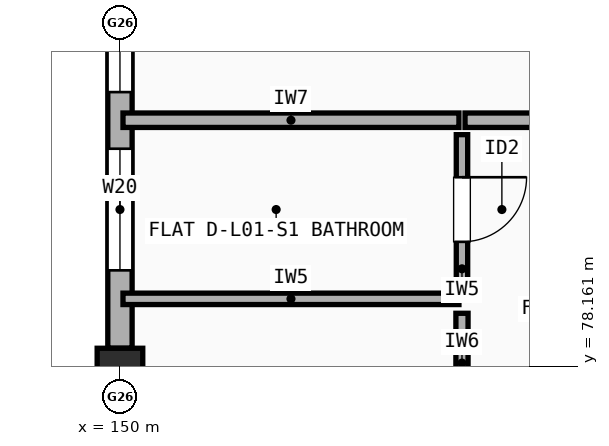
"""IFC4 building model, lengths in metres.
Left out: names, types, materials, properties, quantities, classifications, styles, units other than length and angle.
Written with IfcOpenShell. Run it as: python <this file> out.ifc"""

import sys

from ifc_helpers import new_model, si_unit, direction, frame, frame_2d, origin, origin_2d, place, context, subcontext, project, spatial, rectangle, extrude, element, fill, save


model = new_model("IFC4")
c1 = context("Model", 3, precision=1e-05, world=origin(), true_north=direction((0.0, 1.0)))
c2 = subcontext(c1, "Body", "Model", "MODEL_VIEW")
j1 = project(units=[si_unit("LENGTHUNIT", "METRE"), si_unit("PLANEANGLEUNIT", "RADIAN")], contexts=[c1])
p1 = place(None, origin())
s1 = spatial("IfcSite", under=j1, at=p1, CompositionType="ELEMENT")
p2 = place(p1, origin())
s2 = spatial("IfcBuilding", under=s1, at=p2, CompositionType="ELEMENT")
p3 = place(p2, frame((0.0, 0.0, 4.5)))
s3 = spatial("IfcBuildingStorey", under=s2, at=p3, CompositionType="ELEMENT", Elevation=4.5)
p4 = place(p3, frame((150.0, 78.0, 0.0), z_axis=(0.0, 0.0, 1.0), x_axis=(1.0, 0.0, 0.0)))
e1 = element("IfcColumn", 1, at=p4, inside=s3, PredefinedType="COLUMN", context=c2, shape_type="SweptSolid", body=[
    extrude(rectangle(XDim=0.6, YDim=0.8, at=origin_2d()), origin(), (0.0, 0.0, 1.0), 2.945),
])
p5 = place(p3, frame((150.0, 83.6, 0.0), z_axis=(0.0, 0.0, 1.0), x_axis=(0.0, -1.0, 0.0)))
e2 = element("IfcWall", 2, at=p5, inside=s3, PredefinedType="STANDARD", context=c2, shape_type="SweptSolid", body=[
    extrude(rectangle(XDim=5.2, YDim=0.32, at=frame_2d((2.6, 0.0))), origin(), (0.0, 0.0, 1.0), 2.945),
])
p6 = place(p5, frame((0.33, 0.0, 0.9)))
e3 = element("IfcOpeningElement", 3, at=p6, cuts=e2, PredefinedType="OPENING", context=c2, shape_type="SweptSolid", body=[
    extrude(rectangle(XDim=1.5, YDim=1.4, at=frame_2d((0.75, 0.7))), frame((0.0, 0.17, 0.0), z_axis=(0.0, -1.0, 0.0), x_axis=(1.0, 0.0, 0.0)), (0.0, 0.0, 1.0), 0.34),
])
p7 = place(p5, frame((2.575, 0.0, 0.9)))
e4 = element("IfcOpeningElement", 4, at=p7, cuts=e2, PredefinedType="OPENING", context=c2, shape_type="SweptSolid", body=[
    extrude(rectangle(XDim=1.6, YDim=1.5, at=frame_2d((0.8, 0.75))), frame((0.0, 0.17, 0.0), z_axis=(0.0, -1.0, 0.0), x_axis=(1.0, 0.0, 0.0)), (0.0, 0.0, 1.0), 0.34),
])
p8 = place(p3, frame((150.04, 81.4, 0.0), z_axis=(0.0, 0.0, 1.0), x_axis=(1.0, 0.0, 0.0)))
e5 = element("IfcWall", 5, at=p8, inside=s3, PredefinedType="SOLIDWALL", context=c2, shape_type="SweptSolid", body=[
    extrude(rectangle(XDim=4.42, YDim=0.19, at=frame_2d((2.21, 0.0))), origin(), (0.0, 0.0, 1.0), 2.945),
])
p9 = place(p3, frame((154.54, 81.4, 0.0), z_axis=(0.0, 0.0, 1.0), x_axis=(1.0, 0.0, 0.0)))
e6 = element("IfcWall", 6, at=p9, inside=s3, PredefinedType="SOLIDWALL", context=c2, shape_type="SweptSolid", body=[
    extrude(rectangle(XDim=4.42, YDim=0.19, at=frame_2d((2.21, 0.0))), origin(), (0.0, 0.0, 1.0), 2.945),
])
p10 = place(p9, frame((1.72, 0.0, 0.0)))
e7 = element("IfcOpeningElement", 7, at=p10, cuts=e6, PredefinedType="OPENING", context=c2, shape_type="SweptSolid", body=[
    extrude(rectangle(XDim=0.98, YDim=2.15, at=frame_2d((0.49, 1.075))), frame((0.0, 0.105, 0.0), z_axis=(0.0, -1.0, 0.0), x_axis=(1.0, 0.0, 0.0)), (0.0, 0.0, 1.0), 0.21),
])
p11 = place(p3, frame((154.5, 76.39, 0.0), z_axis=(0.0, 0.0, 1.0), x_axis=(0.0, 1.0, 0.0)))
e8 = element("IfcWall", 8, at=p11, inside=s3, PredefinedType="PLUMBINGWALL", context=c2, shape_type="SweptSolid", body=[
    extrude(rectangle(XDim=2.47, YDim=0.16, at=frame_2d((1.235, 0.0))), origin(), (0.0, 0.0, 1.0), 2.458),
])
p12 = place(p11, frame((0.13, 0.0, 0.0)))
e9 = element("IfcOpeningElement", 9, at=p12, cuts=e8, PredefinedType="OPENING", context=c2, shape_type="SweptSolid", body=[
    extrude(rectangle(XDim=0.88, YDim=2.1, at=frame_2d((0.44, 1.05))), frame((0.0, 0.09, 0.0), z_axis=(0.0, -1.0, 0.0), x_axis=(1.0, 0.0, 0.0)), (0.0, 0.0, 1.0), 0.18),
])
p13 = place(p3, frame((154.5, 79.24, 0.0), z_axis=(0.0, 0.0, 1.0), x_axis=(0.0, 1.0, 0.0)))
e10 = element("IfcWall", 10, at=p13, inside=s3, PredefinedType="PARTITIONING", context=c2, shape_type="SweptSolid", body=[
    extrude(rectangle(XDim=1.97, YDim=0.15, at=frame_2d((0.985, 0.0))), origin(), (0.0, 0.0, 1.0), 2.945),
])
p14 = place(p13, frame((0.56, 0.0, 0.0)))
e11 = element("IfcOpeningElement", 11, at=p14, cuts=e10, PredefinedType="OPENING", context=c2, shape_type="SweptSolid", body=[
    extrude(rectangle(XDim=0.85, YDim=2.1, at=frame_2d((0.425, 1.05))), frame((0.0, 0.085, 0.0), z_axis=(0.0, -1.0, 0.0), x_axis=(1.0, 0.0, 0.0)), (0.0, 0.0, 1.0), 0.17),
])
p15 = place(p3, frame((150.04, 79.05, 0.0), z_axis=(0.0, 0.0, 1.0), x_axis=(1.0, 0.0, 0.0)))
e12 = element("IfcWall", 12, at=p15, inside=s3, PredefinedType="PARTITIONING", context=c2, shape_type="SweptSolid", body=[
    extrude(rectangle(XDim=4.42, YDim=0.15, at=frame_2d((2.21, 0.0))), origin(), (0.0, 0.0, 1.0), 2.945),
])
p16 = place(p6, origin())
e13 = element("IfcWindow", 13, at=p16, inside=s3, PartitioningType="SINGLE_PANEL", PredefinedType="WINDOW", context=c2, shape_type="SweptSolid", body=[
    extrude(rectangle(XDim=1.5, YDim=1.4, at=frame_2d((0.75, 0.7))), frame((0.0, 0.03, 0.0), z_axis=(0.0, -1.0, 0.0), x_axis=(1.0, 0.0, 0.0)), (0.0, 0.0, 1.0), 0.06),
])
fill(e3, e13)
p17 = place(p7, origin())
e14 = element("IfcWindow", 14, at=p17, inside=s3, PartitioningType="SINGLE_PANEL", PredefinedType="WINDOW", context=c2, shape_type="SweptSolid", body=[
    extrude(rectangle(XDim=1.6, YDim=1.5, at=frame_2d((0.8, 0.75))), frame((0.0, 0.03, 0.0), z_axis=(0.0, -1.0, 0.0), x_axis=(1.0, 0.0, 0.0)), (0.0, 0.0, 1.0), 0.06),
])
fill(e4, e14)
p18 = place(p14, origin())
e15 = element("IfcDoor", 15, at=p18, inside=s3, OperationType="SINGLE_SWING_RIGHT", PredefinedType="DOOR", context=c2, shape_type="SweptSolid", body=[
    extrude(rectangle(XDim=0.85, YDim=2.1, at=frame_2d((0.425, 1.05))), frame((0.0, 0.025, 0.0), z_axis=(0.0, -1.0, 0.0), x_axis=(1.0, 0.0, 0.0)), (0.0, 0.0, 1.0), 0.05),
])
fill(e11, e15)
save(model, sys.argv[1])
